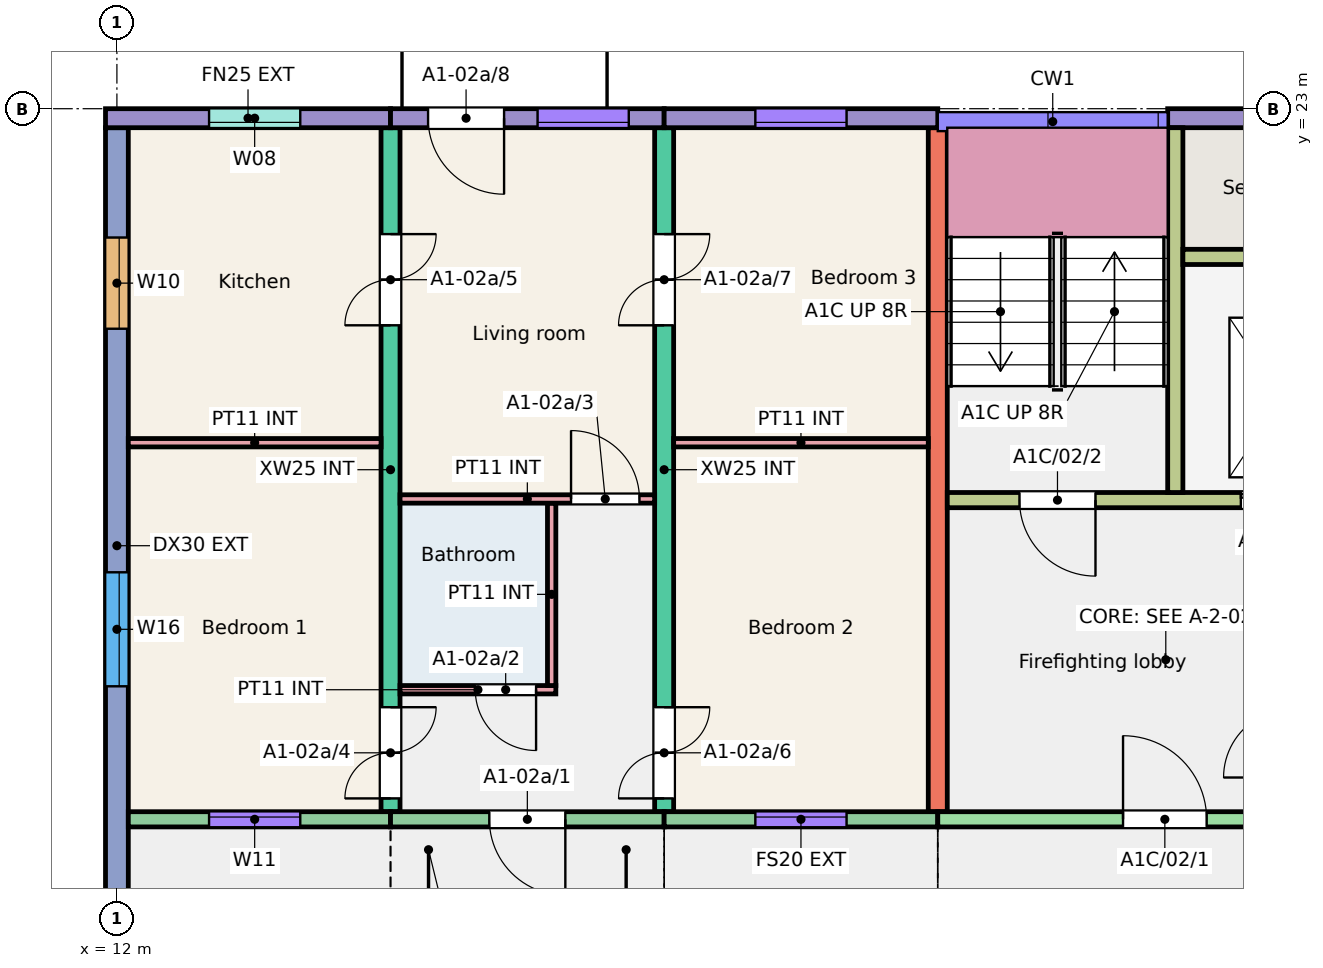
"""IFC4 building model, lengths in metres.
Left out: names, types, materials, properties, quantities, classifications, styles, units other than length and angle.
Written with IfcOpenShell. Run it as: python <this file> out.ifc"""

import sys

from ifc_helpers import new_model, si_unit, direction, frame, frame_2d, origin, place, context, subcontext, project, spatial, rectangle, extrude, element, fill, save


model = new_model("IFC4")
c1 = context("Model", 3, precision=1e-05, world=origin(), true_north=direction((0.0, 1.0)))
c2 = subcontext(c1, "Body", "Model", "MODEL_VIEW")
j1 = project(units=[si_unit("LENGTHUNIT", "METRE"), si_unit("PLANEANGLEUNIT", "RADIAN")], contexts=[c1])
p1 = place(None, origin())
s1 = spatial("IfcSite", under=j1, at=p1, CompositionType="ELEMENT")
p2 = place(p1, origin())
s2 = spatial("IfcBuilding", under=s1, at=p2, CompositionType="ELEMENT")
p3 = place(p2, frame((0.0, 0.0, 6.0)))
s3 = spatial("IfcBuildingStorey", under=s2, at=p3, CompositionType="ELEMENT", Elevation=6.0)
p4 = place(p3, frame((12.0, 11.75, 0.0), z_axis=(0.0, 0.0, 1.0), x_axis=(0.0, 1.0, 0.0)))
e1 = element("IfcWall", 1, at=p4, inside=s3, PredefinedType="SHEAR", context=c2, shape_type="SweptSolid", body=[
    extrude(rectangle(XDim=11.0, YDim=0.3, at=frame_2d((5.5, 0.0))), origin(), (0.0, 0.0, 1.0), 3.0),
])
p5 = place(p4, frame((3.65, 0.0, 0.9)))
e2 = element("IfcOpeningElement", 2, at=p5, cuts=e1, PredefinedType="OPENING", context=c2, shape_type="SweptSolid", body=[
    extrude(rectangle(XDim=1.5, YDim=1.5, at=frame_2d((0.75, 0.75))), frame((0.0, 0.16, 0.0), z_axis=(0.0, -1.0, 0.0), x_axis=(1.0, 0.0, 0.0)), (0.0, 0.0, 1.0), 0.32),
])
p6 = place(p4, frame((8.355, 0.0, 0.9)))
e3 = element("IfcOpeningElement", 3, at=p6, cuts=e1, PredefinedType="OPENING", context=c2, shape_type="SweptSolid", body=[
    extrude(rectangle(XDim=1.2, YDim=1.5, at=frame_2d((0.6, 0.75))), frame((0.0, 0.16, 0.0), z_axis=(0.0, -1.0, 0.0), x_axis=(1.0, 0.0, 0.0)), (0.0, 0.0, 1.0), 0.32),
])
p7 = place(p3, frame((15.6, 13.75, 0.0), z_axis=(0.0, 0.0, 1.0), x_axis=(0.0, 1.0, 0.0)))
e4 = element("IfcWall", 4, at=p7, inside=s3, PredefinedType="SHEAR", context=c2, shape_type="SweptSolid", body=[
    extrude(rectangle(XDim=9.0, YDim=0.25, at=frame_2d((4.5, 0.0))), origin(), (0.0, 0.0, 1.0), 3.0),
])
p8 = place(p7, frame((0.175, 0.0, 0.0)))
e5 = element("IfcOpeningElement", 5, at=p8, cuts=e4, PredefinedType="OPENING", context=c2, shape_type="SweptSolid", body=[
    extrude(rectangle(XDim=1.2, YDim=2.1, at=frame_2d((0.6, 1.05))), frame((0.0, 0.135, 0.0), z_axis=(0.0, -1.0, 0.0), x_axis=(1.0, 0.0, 0.0)), (0.0, 0.0, 1.0), 0.27),
])
p9 = place(p7, frame((6.4, 0.0, 0.0)))
e6 = element("IfcOpeningElement", 6, at=p9, cuts=e4, PredefinedType="OPENING", context=c2, shape_type="SweptSolid", body=[
    extrude(rectangle(XDim=1.2, YDim=2.1, at=frame_2d((0.6, 1.05))), frame((0.0, 0.135, 0.0), z_axis=(0.0, -1.0, 0.0), x_axis=(1.0, 0.0, 0.0)), (0.0, 0.0, 1.0), 0.27),
])
p10 = place(p3, frame((19.2, 13.75, 0.0), z_axis=(0.0, 0.0, 1.0), x_axis=(0.0, 1.0, 0.0)))
e7 = element("IfcWall", 7, at=p10, inside=s3, PredefinedType="SHEAR", context=c2, shape_type="SweptSolid", body=[
    extrude(rectangle(XDim=9.0, YDim=0.25, at=frame_2d((4.5, 0.0))), origin(), (0.0, 0.0, 1.0), 3.0),
])
p11 = place(p10, frame((0.175, 0.0, 0.0)))
e8 = element("IfcOpeningElement", 8, at=p11, cuts=e7, PredefinedType="OPENING", context=c2, shape_type="SweptSolid", body=[
    extrude(rectangle(XDim=1.2, YDim=2.1, at=frame_2d((0.6, 1.05))), frame((0.0, 0.135, 0.0), z_axis=(0.0, -1.0, 0.0), x_axis=(1.0, 0.0, 0.0)), (0.0, 0.0, 1.0), 0.27),
])
p12 = place(p10, frame((6.4, 0.0, 0.0)))
e9 = element("IfcOpeningElement", 9, at=p12, cuts=e7, PredefinedType="OPENING", context=c2, shape_type="SweptSolid", body=[
    extrude(rectangle(XDim=1.2, YDim=2.1, at=frame_2d((0.6, 1.05))), frame((0.0, 0.135, 0.0), z_axis=(0.0, -1.0, 0.0), x_axis=(1.0, 0.0, 0.0)), (0.0, 0.0, 1.0), 0.27),
])
p13 = place(p3, frame((22.8, 13.75, 0.0), z_axis=(0.0, 0.0, 1.0), x_axis=(0.0, 1.0, 0.0)))
e10 = element("IfcWall", 10, at=p13, inside=s3, PredefinedType="SHEAR", context=c2, shape_type="SweptSolid", body=[
    extrude(rectangle(XDim=9.0, YDim=0.25, at=frame_2d((4.5, 0.0))), origin(), (0.0, 0.0, 1.0), 3.0),
])
p14 = place(p3, frame((11.85, 22.875, 0.0), z_axis=(0.0, 0.0, 1.0), x_axis=(1.0, 0.0, 0.0)))
e11 = element("IfcWall", 11, at=p14, inside=s3, PredefinedType="SOLIDWALL", context=c2, shape_type="SweptSolid", body=[
    extrude(rectangle(XDim=3.75, YDim=0.25, at=frame_2d((1.875, 0.0))), origin(), (0.0, 0.0, 1.0), 3.0),
])
p15 = place(p14, frame((1.363, 0.0, 1.1)))
e12 = element("IfcOpeningElement", 12, at=p15, cuts=e11, PredefinedType="OPENING", context=c2, shape_type="SweptSolid", body=[
    extrude(rectangle(XDim=1.2, YDim=1.3, at=frame_2d((0.6, 0.65))), frame((0.0, 0.135, 0.0), z_axis=(0.0, -1.0, 0.0), x_axis=(1.0, 0.0, 0.0)), (0.0, 0.0, 1.0), 0.27),
])
p16 = place(p3, frame((12.15, 13.65, 0.0), z_axis=(0.0, 0.0, 1.0), x_axis=(1.0, 0.0, 0.0)))
e13 = element("IfcWall", 13, at=p16, inside=s3, PredefinedType="SOLIDWALL", context=c2, shape_type="SweptSolid", body=[
    extrude(rectangle(XDim=3.45, YDim=0.2, at=frame_2d((1.725, 0.0))), origin(), (0.0, 0.0, 1.0), 3.0),
])
p17 = place(p16, frame((1.062, 0.0, 0.8)))
e14 = element("IfcOpeningElement", 14, at=p17, cuts=e13, PredefinedType="OPENING", context=c2, shape_type="SweptSolid", body=[
    extrude(rectangle(XDim=1.2, YDim=1.6, at=frame_2d((0.6, 0.8))), frame((0.0, 0.11, 0.0), z_axis=(0.0, -1.0, 0.0), x_axis=(1.0, 0.0, 0.0)), (0.0, 0.0, 1.0), 0.22),
])
p18 = place(p3, frame((15.6, 22.875, 0.0), z_axis=(0.0, 0.0, 1.0), x_axis=(1.0, 0.0, 0.0)))
e15 = element("IfcWall", 15, at=p18, inside=s3, PredefinedType="SOLIDWALL", context=c2, shape_type="SweptSolid", body=[
    extrude(rectangle(XDim=3.6, YDim=0.25, at=frame_2d((1.8, 0.0))), origin(), (0.0, 0.0, 1.0), 3.0),
])
p19 = place(p18, frame((1.935, 0.0, 0.8)))
e16 = element("IfcOpeningElement", 16, at=p19, cuts=e15, PredefinedType="OPENING", context=c2, shape_type="SweptSolid", body=[
    extrude(rectangle(XDim=1.2, YDim=1.6, at=frame_2d((0.6, 0.8))), frame((0.0, 0.135, 0.0), z_axis=(0.0, -1.0, 0.0), x_axis=(1.0, 0.0, 0.0)), (0.0, 0.0, 1.0), 0.27),
])
p20 = place(p18, frame((0.494, 0.0, 0.0)))
e17 = element("IfcOpeningElement", 17, at=p20, cuts=e15, PredefinedType="OPENING", context=c2, shape_type="SweptSolid", body=[
    extrude(rectangle(XDim=1.0, YDim=2.1, at=frame_2d((0.5, 1.05))), frame((0.0, 0.135, 0.0), z_axis=(0.0, -1.0, 0.0), x_axis=(1.0, 0.0, 0.0)), (0.0, 0.0, 1.0), 0.27),
])
p21 = place(p3, frame((15.6, 13.65, 0.0), z_axis=(0.0, 0.0, 1.0), x_axis=(1.0, 0.0, 0.0)))
e18 = element("IfcWall", 18, at=p21, inside=s3, PredefinedType="SOLIDWALL", context=c2, shape_type="SweptSolid", body=[
    extrude(rectangle(XDim=3.6, YDim=0.2, at=frame_2d((1.8, 0.0))), origin(), (0.0, 0.0, 1.0), 3.0),
])
p22 = place(p21, frame((1.3, 0.0, 0.0)))
e19 = element("IfcOpeningElement", 19, at=p22, cuts=e18, PredefinedType="OPENING", context=c2, shape_type="SweptSolid", body=[
    extrude(rectangle(XDim=1.0, YDim=2.1, at=frame_2d((0.5, 1.05))), frame((0.0, 0.11, 0.0), z_axis=(0.0, -1.0, 0.0), x_axis=(1.0, 0.0, 0.0)), (0.0, 0.0, 1.0), 0.22),
])
p23 = place(p3, frame((19.2, 22.875, 0.0), z_axis=(0.0, 0.0, 1.0), x_axis=(1.0, 0.0, 0.0)))
e20 = element("IfcWall", 20, at=p23, inside=s3, PredefinedType="SOLIDWALL", context=c2, shape_type="SweptSolid", body=[
    extrude(rectangle(XDim=3.6, YDim=0.25, at=frame_2d((1.8, 0.0))), origin(), (0.0, 0.0, 1.0), 3.0),
])
p24 = place(p23, frame((1.2, 0.0, 0.8)))
e21 = element("IfcOpeningElement", 21, at=p24, cuts=e20, PredefinedType="OPENING", context=c2, shape_type="SweptSolid", body=[
    extrude(rectangle(XDim=1.2, YDim=1.6, at=frame_2d((0.6, 0.8))), frame((0.0, 0.135, 0.0), z_axis=(0.0, -1.0, 0.0), x_axis=(1.0, 0.0, 0.0)), (0.0, 0.0, 1.0), 0.27),
])
p25 = place(p3, frame((19.2, 13.65, 0.0), z_axis=(0.0, 0.0, 1.0), x_axis=(1.0, 0.0, 0.0)))
e22 = element("IfcWall", 22, at=p25, inside=s3, PredefinedType="SOLIDWALL", context=c2, shape_type="SweptSolid", body=[
    extrude(rectangle(XDim=3.6, YDim=0.2, at=frame_2d((1.8, 0.0))), origin(), (0.0, 0.0, 1.0), 3.0),
])
p26 = place(p25, frame((1.2, 0.0, 0.8)))
e23 = element("IfcOpeningElement", 23, at=p26, cuts=e22, PredefinedType="OPENING", context=c2, shape_type="SweptSolid", body=[
    extrude(rectangle(XDim=1.2, YDim=1.6, at=frame_2d((0.6, 0.8))), frame((0.0, 0.11, 0.0), z_axis=(0.0, -1.0, 0.0), x_axis=(1.0, 0.0, 0.0)), (0.0, 0.0, 1.0), 0.22),
])
p27 = place(p3, frame((25.825, 22.875, 0.0), z_axis=(0.0, 0.0, 1.0), x_axis=(1.0, 0.0, 0.0)))
e24 = element("IfcWall", 24, at=p27, inside=s3, PredefinedType="SOLIDWALL", context=c2, shape_type="SweptSolid", body=[
    extrude(rectangle(XDim=2.975, YDim=0.25, at=frame_2d((1.488, 0.0))), origin(), (0.0, 0.0, 1.0), 3.0),
])
p28 = place(p3, frame((22.8, 13.65, 0.0), z_axis=(0.0, 0.0, 1.0), x_axis=(1.0, 0.0, 0.0)))
e25 = element("IfcWall", 25, at=p28, inside=s3, PredefinedType="SHEAR", context=c2, shape_type="SweptSolid", body=[
    extrude(rectangle(XDim=5.85, YDim=0.2, at=frame_2d((2.925, 0.0))), origin(), (0.0, 0.0, 1.0), 3.0),
])
p29 = place(p28, frame((2.438, 0.0, 0.0)))
e26 = element("IfcOpeningElement", 26, at=p29, cuts=e25, PredefinedType="OPENING", context=c2, shape_type="SweptSolid", body=[
    extrude(rectangle(XDim=1.1, YDim=2.1, at=frame_2d((0.55, 1.05))), frame((0.0, 0.11, 0.0), z_axis=(0.0, -1.0, 0.0), x_axis=(1.0, 0.0, 0.0)), (0.0, 0.0, 1.0), 0.22),
])
p30 = place(p3, frame((22.925, 17.85, 0.0), z_axis=(0.0, 0.0, 1.0), x_axis=(1.0, 0.0, 0.0)))
e27 = element("IfcWall", 27, at=p30, inside=s3, PredefinedType="SHEAR", context=c2, shape_type="SweptSolid", body=[
    extrude(rectangle(XDim=5.725, YDim=0.2, at=frame_2d((2.862, 0.0))), origin(), (0.0, 0.0, 1.0), 3.0),
])
p31 = place(p30, frame((0.95, 0.0, 0.0)))
e28 = element("IfcOpeningElement", 28, at=p31, cuts=e27, PredefinedType="OPENING", context=c2, shape_type="SweptSolid", body=[
    extrude(rectangle(XDim=1.0, YDim=2.1, at=frame_2d((0.5, 1.05))), frame((0.0, 0.11, 0.0), z_axis=(0.0, -1.0, 0.0), x_axis=(1.0, 0.0, 0.0)), (0.0, 0.0, 1.0), 0.22),
])
p32 = place(p30, frame((3.863, 0.0, 0.0)))
e29 = element("IfcOpeningElement", 29, at=p32, cuts=e27, PredefinedType="OPENING", context=c2, shape_type="SweptSolid", body=[
    extrude(rectangle(XDim=1.1, YDim=2.1, at=frame_2d((0.55, 1.05))), frame((0.0, 0.11, 0.0), z_axis=(0.0, -1.0, 0.0), x_axis=(1.0, 0.0, 0.0)), (0.0, 0.0, 1.0), 0.22),
])
p33 = place(p3, frame((25.925, 17.95, 0.0), z_axis=(0.0, 0.0, 1.0), x_axis=(0.0, 1.0, 0.0)))
e30 = element("IfcWall", 30, at=p33, inside=s3, PredefinedType="SHEAR", context=c2, shape_type="SweptSolid", body=[
    extrude(rectangle(XDim=4.8, YDim=0.2, at=frame_2d((2.4, 0.0))), origin(), (0.0, 0.0, 1.0), 3.0),
])
p34 = place(p3, frame((26.025, 21.05, 0.0), z_axis=(0.0, 0.0, 1.0), x_axis=(1.0, 0.0, 0.0)))
e31 = element("IfcWall", 31, at=p34, inside=s3, PredefinedType="SHEAR", context=c2, shape_type="SweptSolid", body=[
    extrude(rectangle(XDim=2.625, YDim=0.2, at=frame_2d((1.312, 0.0))), origin(), (0.0, 0.0, 1.0), 3.0),
])
p35 = place(p3, frame((15.725, 15.355, 0.0), z_axis=(0.0, 0.0, 1.0), x_axis=(1.0, 0.0, 0.0)))
e32 = element("IfcWall", 32, at=p35, inside=s3, PredefinedType="PARTITIONING", context=c2, shape_type="SweptSolid", body=[
    extrude(rectangle(XDim=2.05, YDim=0.11, at=frame_2d((1.025, 0.0))), origin(), (0.0, 0.0, 1.0), 2.8),
])
p36 = place(p35, frame((0.99, 0.0, 0.0)))
e33 = element("IfcOpeningElement", 33, at=p36, cuts=e32, PredefinedType="OPENING", context=c2, shape_type="SweptSolid", body=[
    extrude(rectangle(XDim=0.8, YDim=2.1, at=frame_2d((0.4, 1.05))), frame((0.0, 0.065, 0.0), z_axis=(0.0, -1.0, 0.0), x_axis=(1.0, 0.0, 0.0)), (0.0, 0.0, 1.0), 0.13),
])
p37 = place(p3, frame((17.72, 15.41, 0.0), z_axis=(0.0, 0.0, 1.0), x_axis=(0.0, 1.0, 0.0)))
e34 = element("IfcWall", 34, at=p37, inside=s3, PredefinedType="PARTITIONING", context=c2, shape_type="SweptSolid", body=[
    extrude(rectangle(XDim=2.4, YDim=0.11, at=frame_2d((1.2, 0.0))), origin(), (0.0, 0.0, 1.0), 2.8),
])
p38 = place(p3, frame((15.725, 17.865, 0.0), z_axis=(0.0, 0.0, 1.0), x_axis=(1.0, 0.0, 0.0)))
e35 = element("IfcWall", 35, at=p38, inside=s3, PredefinedType="PARTITIONING", context=c2, shape_type="SweptSolid", body=[
    extrude(rectangle(XDim=3.35, YDim=0.11, at=frame_2d((1.675, 0.0))), origin(), (0.0, 0.0, 1.0), 2.8),
])
p39 = place(p38, frame((2.25, 0.0, 0.0)))
e36 = element("IfcOpeningElement", 36, at=p39, cuts=e35, PredefinedType="OPENING", context=c2, shape_type="SweptSolid", body=[
    extrude(rectangle(XDim=0.9, YDim=2.1, at=frame_2d((0.45, 1.05))), frame((0.0, 0.065, 0.0), z_axis=(0.0, -1.0, 0.0), x_axis=(1.0, 0.0, 0.0)), (0.0, 0.0, 1.0), 0.13),
])
p40 = place(p3, frame((12.15, 18.605, 0.0), z_axis=(0.0, 0.0, 1.0), x_axis=(1.0, 0.0, 0.0)))
e37 = element("IfcWall", 37, at=p40, inside=s3, PredefinedType="PARTITIONING", context=c2, shape_type="SweptSolid", body=[
    extrude(rectangle(XDim=3.325, YDim=0.11, at=frame_2d((1.663, 0.0))), origin(), (0.0, 0.0, 1.0), 2.8),
])
p41 = place(p3, frame((19.325, 18.605, 0.0), z_axis=(0.0, 0.0, 1.0), x_axis=(1.0, 0.0, 0.0)))
e38 = element("IfcWall", 38, at=p41, inside=s3, PredefinedType="PARTITIONING", context=c2, shape_type="SweptSolid", body=[
    extrude(rectangle(XDim=3.35, YDim=0.11, at=frame_2d((1.675, 0.0))), origin(), (0.0, 0.0, 1.0), 2.8),
])
p42 = place(p17, origin())
e39 = element("IfcWindow", 39, at=p42, inside=s3, PartitioningType="SINGLE_PANEL", PredefinedType="WINDOW", context=c2, shape_type="SweptSolid", body=[
    extrude(rectangle(XDim=1.2, YDim=1.6, at=frame_2d((0.6, 0.8))), frame((0.0, 0.06, 0.0), z_axis=(0.0, -1.0, 0.0), x_axis=(1.0, 0.0, 0.0)), (0.0, 0.0, 1.0), 0.06),
])
fill(e14, e39)
p43 = place(p15, origin())
e40 = element("IfcWindow", 40, at=p43, inside=s3, PartitioningType="SINGLE_PANEL", PredefinedType="WINDOW", context=c2, shape_type="SweptSolid", body=[
    extrude(rectangle(XDim=1.2, YDim=1.3, at=frame_2d((0.6, 0.65))), frame((0.0, -0.025, 0.0), z_axis=(0.0, -1.0, 0.0), x_axis=(1.0, 0.0, 0.0)), (0.0, 0.0, 1.0), 0.06),
])
fill(e12, e40)
p44 = place(p26, origin())
e41 = element("IfcWindow", 41, at=p44, inside=s3, PartitioningType="SINGLE_PANEL", PredefinedType="WINDOW", context=c2, shape_type="SweptSolid", body=[
    extrude(rectangle(XDim=1.2, YDim=1.6, at=frame_2d((0.6, 0.8))), frame((0.0, 0.06, 0.0), z_axis=(0.0, -1.0, 0.0), x_axis=(1.0, 0.0, 0.0)), (0.0, 0.0, 1.0), 0.06),
])
fill(e23, e41)
p45 = place(p24, origin())
e42 = element("IfcWindow", 42, at=p45, inside=s3, PartitioningType="SINGLE_PANEL", PredefinedType="WINDOW", context=c2, shape_type="SweptSolid", body=[
    extrude(rectangle(XDim=1.2, YDim=1.6, at=frame_2d((0.6, 0.8))), frame((0.0, -0.025, 0.0), z_axis=(0.0, -1.0, 0.0), x_axis=(1.0, 0.0, 0.0)), (0.0, 0.0, 1.0), 0.06),
])
fill(e21, e42)
p46 = place(p19, origin())
e43 = element("IfcWindow", 43, at=p46, inside=s3, PartitioningType="SINGLE_PANEL", PredefinedType="WINDOW", context=c2, shape_type="SweptSolid", body=[
    extrude(rectangle(XDim=1.2, YDim=1.6, at=frame_2d((0.6, 0.8))), frame((0.0, -0.025, 0.0), z_axis=(0.0, -1.0, 0.0), x_axis=(1.0, 0.0, 0.0)), (0.0, 0.0, 1.0), 0.06),
])
fill(e16, e43)
p47 = place(p5, origin())
e44 = element("IfcWindow", 44, at=p47, inside=s3, PartitioningType="SINGLE_PANEL", PredefinedType="WINDOW", context=c2, shape_type="SweptSolid", body=[
    extrude(rectangle(XDim=1.5, YDim=1.5, at=frame_2d((0.75, 0.75))), frame((0.0, 0.0, 0.0), z_axis=(0.0, -1.0, 0.0), x_axis=(1.0, 0.0, 0.0)), (0.0, 0.0, 1.0), 0.06),
])
fill(e2, e44)
p48 = place(p6, origin())
e45 = element("IfcWindow", 45, at=p48, inside=s3, PartitioningType="SINGLE_PANEL", PredefinedType="WINDOW", context=c2, shape_type="SweptSolid", body=[
    extrude(rectangle(XDim=1.2, YDim=1.5, at=frame_2d((0.6, 0.75))), frame((0.0, 0.0, 0.0), z_axis=(0.0, -1.0, 0.0), x_axis=(1.0, 0.0, 0.0)), (0.0, 0.0, 1.0), 0.06),
])
fill(e3, e45)
p49 = place(p22, origin())
e46 = element("IfcDoor", 46, at=p49, inside=s3, OperationType="SINGLE_SWING_RIGHT", PredefinedType="DOOR", context=c2, shape_type="SweptSolid", body=[
    extrude(rectangle(XDim=1.0, YDim=2.1, at=frame_2d((0.5, 1.05))), frame((0.0, 0.025, 0.0), z_axis=(0.0, -1.0, 0.0), x_axis=(1.0, 0.0, 0.0)), (0.0, 0.0, 1.0), 0.05),
])
fill(e19, e46)
p50 = place(p36, origin())
e47 = element("IfcDoor", 47, at=p50, inside=s3, OperationType="SINGLE_SWING_RIGHT", PredefinedType="DOOR", context=c2, shape_type="SweptSolid", body=[
    extrude(rectangle(XDim=0.8, YDim=2.1, at=frame_2d((0.4, 1.05))), frame((0.0, 0.025, 0.0), z_axis=(0.0, -1.0, 0.0), x_axis=(1.0, 0.0, 0.0)), (0.0, 0.0, 1.0), 0.05),
])
fill(e33, e47)
p51 = place(p39, origin())
e48 = element("IfcDoor", 48, at=p51, inside=s3, OperationType="SINGLE_SWING_LEFT", PredefinedType="DOOR", context=c2, shape_type="SweptSolid", body=[
    extrude(rectangle(XDim=0.9, YDim=2.1, at=frame_2d((0.45, 1.05))), frame((0.0, 0.025, 0.0), z_axis=(0.0, -1.0, 0.0), x_axis=(1.0, 0.0, 0.0)), (0.0, 0.0, 1.0), 0.05),
])
fill(e36, e48)
p52 = place(p8, origin())
e49 = element("IfcDoor", 49, at=p52, inside=s3, OperationType="DOUBLE_DOOR_SINGLE_SWING", PredefinedType="DOOR", context=c2, shape_type="SweptSolid", body=[
    extrude(rectangle(XDim=1.2, YDim=2.1, at=frame_2d((0.6, 1.05))), frame((0.0, 0.025, 0.0), z_axis=(0.0, -1.0, 0.0), x_axis=(1.0, 0.0, 0.0)), (0.0, 0.0, 1.0), 0.05),
])
fill(e5, e49)
p53 = place(p9, origin())
e50 = element("IfcDoor", 50, at=p53, inside=s3, OperationType="DOUBLE_DOOR_SINGLE_SWING", PredefinedType="DOOR", context=c2, shape_type="SweptSolid", body=[
    extrude(rectangle(XDim=1.2, YDim=2.1, at=frame_2d((0.6, 1.05))), frame((0.0, 0.025, 0.0), z_axis=(0.0, -1.0, 0.0), x_axis=(1.0, 0.0, 0.0)), (0.0, 0.0, 1.0), 0.05),
])
fill(e6, e50)
p54 = place(p11, origin())
e51 = element("IfcDoor", 51, at=p54, inside=s3, OperationType="DOUBLE_DOOR_SINGLE_SWING", PredefinedType="DOOR", context=c2, shape_type="SweptSolid", body=[
    extrude(rectangle(XDim=1.2, YDim=2.1, at=frame_2d((0.6, 1.05))), frame((0.0, 0.025, 0.0), z_axis=(0.0, -1.0, 0.0), x_axis=(1.0, 0.0, 0.0)), (0.0, 0.0, 1.0), 0.05),
])
fill(e8, e51)
p55 = place(p12, origin())
e52 = element("IfcDoor", 52, at=p55, inside=s3, OperationType="DOUBLE_DOOR_SINGLE_SWING", PredefinedType="DOOR", context=c2, shape_type="SweptSolid", body=[
    extrude(rectangle(XDim=1.2, YDim=2.1, at=frame_2d((0.6, 1.05))), frame((0.0, 0.025, 0.0), z_axis=(0.0, -1.0, 0.0), x_axis=(1.0, 0.0, 0.0)), (0.0, 0.0, 1.0), 0.05),
])
fill(e9, e52)
p56 = place(p20, origin())
e53 = element("IfcDoor", 53, at=p56, inside=s3, OperationType="SINGLE_SWING_RIGHT", PredefinedType="DOOR", context=c2, shape_type="SweptSolid", body=[
    extrude(rectangle(XDim=1.0, YDim=2.1, at=frame_2d((0.5, 1.05))), frame((0.0, 0.025, 0.0), z_axis=(0.0, -1.0, 0.0), x_axis=(1.0, 0.0, 0.0)), (0.0, 0.0, 1.0), 0.05),
])
fill(e17, e53)
p57 = place(p29, origin())
e54 = element("IfcDoor", 54, at=p57, inside=s3, OperationType="SINGLE_SWING_LEFT", PredefinedType="DOOR", context=c2, shape_type="SweptSolid", body=[
    extrude(rectangle(XDim=1.1, YDim=2.1, at=frame_2d((0.55, 1.05))), frame((0.0, 0.025, 0.0), z_axis=(0.0, -1.0, 0.0), x_axis=(1.0, 0.0, 0.0)), (0.0, 0.0, 1.0), 0.05),
])
fill(e26, e54)
p58 = place(p31, origin())
e55 = element("IfcDoor", 55, at=p58, inside=s3, OperationType="SINGLE_SWING_RIGHT", PredefinedType="DOOR", context=c2, shape_type="SweptSolid", body=[
    extrude(rectangle(XDim=1.0, YDim=2.1, at=frame_2d((0.5, 1.05))), frame((0.0, 0.025, 0.0), z_axis=(0.0, -1.0, 0.0), x_axis=(1.0, 0.0, 0.0)), (0.0, 0.0, 1.0), 0.05),
])
fill(e28, e55)
p59 = place(p32, origin())
e56 = element("IfcDoor", 56, at=p59, inside=s3, OperationType="DOUBLE_DOOR_SLIDING", PredefinedType="DOOR", context=c2, shape_type="SweptSolid", body=[
    extrude(rectangle(XDim=1.1, YDim=2.1, at=frame_2d((0.55, 1.05))), frame((0.0, 0.025, 0.0), z_axis=(0.0, -1.0, 0.0), x_axis=(1.0, 0.0, 0.0)), (0.0, 0.0, 1.0), 0.05),
])
fill(e29, e56)
save(model, sys.argv[1])
